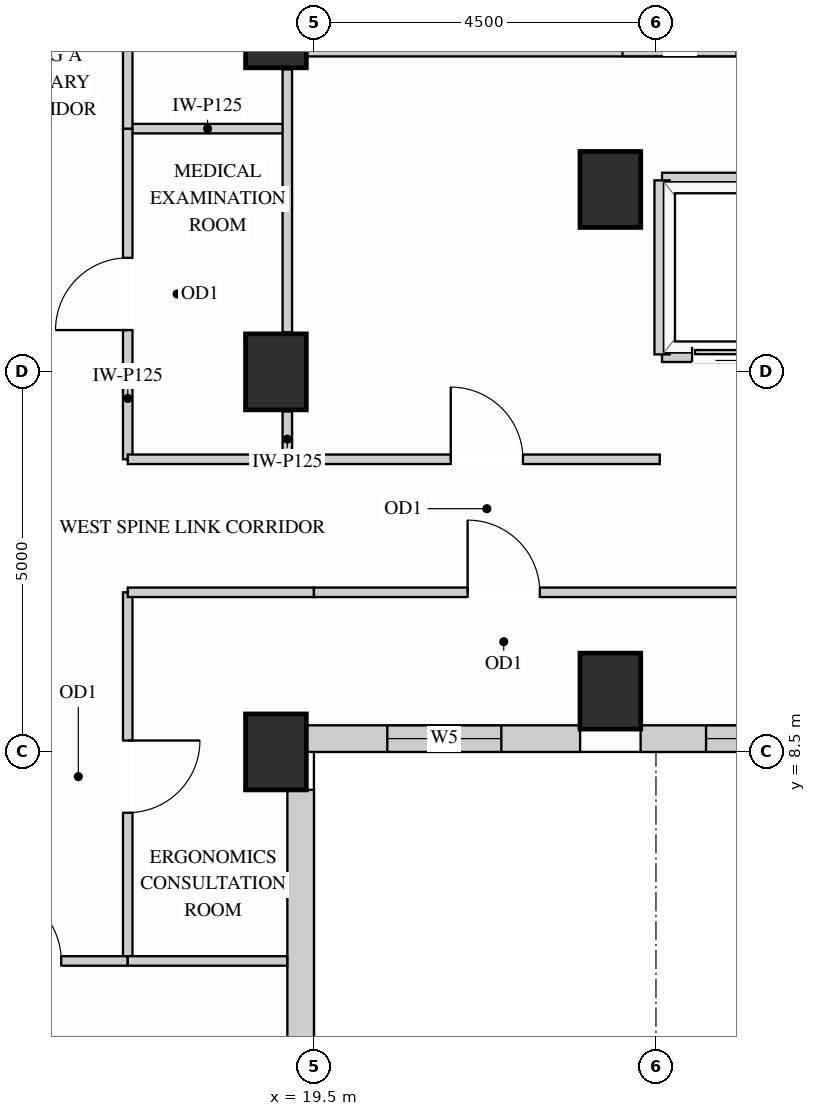
"""IFC4 building model, lengths in metres.
Left out: names, types, materials, properties, quantities, classifications, styles, units other than length and angle.
Written with IfcOpenShell. Run it as: python <this file> out.ifc"""

import sys

from ifc_helpers import new_model, si_unit, direction, frame, frame_2d, origin, origin_2d, place, context, subcontext, project, spatial, rectangle, extrude, source, transform, mapped, element, fill, save


model = new_model("IFC4")
c1 = context("Model", 3, precision=1e-05, world=origin(), true_north=direction((0.0, 1.0)))
c2 = subcontext(c1, "Body", "Model", "MODEL_VIEW")
j1 = project(units=[si_unit("LENGTHUNIT", "METRE"), si_unit("PLANEANGLEUNIT", "RADIAN")], contexts=[c1])
p1 = place(None, origin())
s1 = spatial("IfcSite", under=j1, at=p1, CompositionType="ELEMENT")
p2 = place(p1, origin())
s2 = spatial("IfcBuilding", under=s1, at=p2, CompositionType="ELEMENT")
p3 = place(p2, frame((0.0, 0.0, 182.7)))
s3 = spatial("IfcBuildingStorey", under=s2, at=p3, CompositionType="ELEMENT", Elevation=182.7)
m1 = source(origin(), c2, "Body", "SweptSolid", [
    extrude(rectangle(XDim=0.8, YDim=1.0, at=origin_2d()), origin(), (0.0, 0.0, 1.0), 3.4),
])
for number, where, z_axis, x_axis in (
    (1, (19.0, 13.5, 0.0), (0.0, 0.0, 1.0), (1.0, 0.0, 0.0)),
    (2, (19.0, 18.0, 0.0), (0.0, 0.0, 1.0), (1.0, 0.0, 0.0)),
    (3, (19.0, 8.5, 0.0), (0.0, 0.0, 1.0), (1.0, 0.0, 0.0)),
    (4, (23.4, 15.9, 0.0), (0.0, 0.0, 1.0), (1.0, 0.0, 0.0)),
    (5, (23.4, 9.3, 0.0), (0.0, 0.0, 1.0), (1.0, 0.0, 0.0)),
):
    element("IfcColumn", number, at=place(p3, frame(where, z_axis=z_axis, x_axis=x_axis)), inside=s3, PredefinedType="COLUMN", context=c2, shape_type="MappedRepresentation", body=[
        mapped(m1, transform((0.0, 0.0, 0.0), x_axis=(1.0, 0.0, 0.0), y_axis=(0.0, 1.0, 0.0), z_axis=(0.0, 0.0, 1.0))),
    ])
m2 = source(origin(), c2, "Body", "SweptSolid", [
    extrude(rectangle(XDim=4.004, YDim=0.35, at=frame_2d((2.002, 0.0))), origin(), (0.0, 0.0, 1.0), 2.612),
])
p4 = place(p3, frame((19.325, 3.998, 0.0), z_axis=(0.0, 0.0, 1.0), x_axis=(0.0, 1.0, 0.0)))
e6 = element("IfcWall", 6, at=p4, inside=s3, PredefinedType="SOLIDWALL", context=c2, shape_type="MappedRepresentation", body=[
    mapped(m2, transform((0.0, 0.0, 0.0), x_axis=(1.0, 0.0, 0.0), y_axis=(0.0, 1.0, 0.0), z_axis=(0.0, 0.0, 1.0))),
])
p5 = place(p3, frame((19.398, 8.675, 0.0), z_axis=(0.0, 0.0, 1.0), x_axis=(1.0, 0.0, 0.0)))
e7 = element("IfcWall", 7, at=p5, inside=s3, PredefinedType="SOLIDWALL", context=c2, shape_type="SweptSolid", body=[
    extrude(rectangle(XDim=3.604, YDim=0.35, at=frame_2d((1.802, 0.0))), origin(), (0.0, 0.0, 1.0), 3.385),
])
p6 = place(p5, frame((1.067, 0.0, 0.78)))
e8 = element("IfcOpeningElement", 8, at=p6, cuts=e7, PredefinedType="OPENING", context=c2, shape_type="SweptSolid", body=[
    extrude(rectangle(XDim=1.5, YDim=2.0, at=frame_2d((0.75, 1.0))), frame((0.0, 0.185, 0.0), z_axis=(0.0, -1.0, 0.0), x_axis=(1.0, 0.0, 0.0)), (0.0, 0.0, 1.0), 0.37),
])
p7 = place(p3, frame((23.798, 8.675, 0.0), z_axis=(0.0, 0.0, 1.0), x_axis=(1.0, 0.0, 0.0)))
e9 = element("IfcWall", 9, at=p7, inside=s3, PredefinedType="SOLIDWALL", context=c2, shape_type="SweptSolid", body=[
    extrude(rectangle(XDim=6.304, YDim=0.35, at=frame_2d((3.152, 0.0))), origin(), (0.0, 0.0, 1.0), 3.385),
])
p8 = place(p7, frame((0.861, 0.0, 0.78)))
e10 = element("IfcOpeningElement", 10, at=p8, cuts=e9, PredefinedType="OPENING", context=c2, shape_type="SweptSolid", body=[
    extrude(rectangle(XDim=1.5, YDim=2.0, at=frame_2d((0.75, 1.0))), frame((0.0, 0.185, 0.0), z_axis=(0.0, -1.0, 0.0), x_axis=(1.0, 0.0, 0.0)), (0.0, 0.0, 1.0), 0.37),
])
p9 = place(p7, frame((3.943, 0.0, 0.78)))
e11 = element("IfcOpeningElement", 11, at=p9, cuts=e9, PredefinedType="OPENING", context=c2, shape_type="SweptSolid", body=[
    extrude(rectangle(XDim=1.5, YDim=2.0, at=frame_2d((0.75, 1.0))), frame((0.0, 0.185, 0.0), z_axis=(0.0, -1.0, 0.0), x_axis=(1.0, 0.0, 0.0)), (0.0, 0.0, 1.0), 0.37),
])
p10 = place(p3, frame((34.502, 17.825, 0.0), z_axis=(0.0, 0.0, 1.0), x_axis=(-1.0, 0.0, 0.0)))
e12 = element("IfcWall", 12, at=p10, inside=s3, PredefinedType="SOLIDWALL", context=c2, shape_type="SweptSolid", body=[
    extrude(rectangle(XDim=15.104, YDim=0.35, at=frame_2d((7.552, 0.0))), origin(), (0.0, 0.0, 1.0), 3.385),
])
p11 = place(p10, frame((4.131, 0.0, 0.78)))
e13 = element("IfcOpeningElement", 13, at=p11, cuts=e12, PredefinedType="OPENING", context=c2, shape_type="SweptSolid", body=[
    extrude(rectangle(XDim=1.5, YDim=2.0, at=frame_2d((0.75, 1.0))), frame((0.0, 0.185, 0.0), z_axis=(0.0, -1.0, 0.0), x_axis=(1.0, 0.0, 0.0)), (0.0, 0.0, 1.0), 0.37),
])
p12 = place(p10, frame((9.442, 0.0, 0.78)))
e14 = element("IfcOpeningElement", 14, at=p12, cuts=e12, PredefinedType="OPENING", context=c2, shape_type="SweptSolid", body=[
    extrude(rectangle(XDim=1.5, YDim=2.0, at=frame_2d((0.75, 1.0))), frame((0.0, 0.185, 0.0), z_axis=(0.0, -1.0, 0.0), x_axis=(1.0, 0.0, 0.0)), (0.0, 0.0, 1.0), 0.37),
])
m3 = source(origin(), c2, "Body", "SweptSolid", [
    extrude(rectangle(XDim=2.1, YDim=0.125, at=frame_2d((1.05, 0.0))), origin(), (0.0, 0.0, 1.0), 2.916),
])
p13 = place(p3, frame((17.05, 16.7, 0.0), z_axis=(0.0, 0.0, 1.0), x_axis=(1.0, 0.0, 0.0)))
e15 = element("IfcWall", 15, at=p13, inside=s3, PredefinedType="PARTITIONING", context=c2, shape_type="MappedRepresentation", body=[
    mapped(m3, transform((0.0, 0.0, 0.0), x_axis=(1.0, 0.0, 0.0), y_axis=(0.0, 1.0, 0.0), z_axis=(0.0, 0.0, 1.0))),
])
m4 = source(origin(), c2, "Body", "SweptSolid", [
    extrude(rectangle(XDim=0.63, YDim=0.125, at=frame_2d((0.315, 0.0))), origin(), (0.0, 0.0, 1.0), 2.773),
])
p14 = place(p3, frame((19.15, 12.35, 0.0), z_axis=(0.0, 0.0, 1.0), x_axis=(0.0, 1.0, 0.0)))
e16 = element("IfcWall", 16, at=p14, inside=s3, PredefinedType="PARTITIONING", context=c2, shape_type="MappedRepresentation", body=[
    mapped(m4, transform((0.0, 0.0, 0.0), x_axis=(1.0, 0.0, 0.0), y_axis=(0.0, 1.0, 0.0), z_axis=(0.0, 0.0, 1.0))),
])
m5 = source(origin(), c2, "Body", "SweptSolid", [
    extrude(rectangle(XDim=3.46, YDim=0.125, at=frame_2d((1.73, 0.0))), origin(), (0.0, 0.0, 1.0), 2.773),
])
p15 = place(p3, frame((19.15, 14.02, 0.0), z_axis=(0.0, 0.0, 1.0), x_axis=(0.0, 1.0, 0.0)))
e17 = element("IfcWall", 17, at=p15, inside=s3, PredefinedType="PARTITIONING", context=c2, shape_type="MappedRepresentation", body=[
    mapped(m5, transform((0.0, 0.0, 0.0), x_axis=(1.0, 0.0, 0.0), y_axis=(0.0, 1.0, 0.0), z_axis=(0.0, 0.0, 1.0))),
])
p16 = place(p3, frame((17.05, 12.35, 0.0), z_axis=(0.0, 0.0, 1.0), x_axis=(0.0, 1.0, 0.0)))
e18 = element("IfcWall", 18, at=p16, inside=s3, PredefinedType="PARTITIONING", context=c2, shape_type="SweptSolid", body=[
    extrude(rectangle(XDim=4.35, YDim=0.125, at=frame_2d((2.175, 0.0))), origin(), (0.0, 0.0, 1.0), 3.385),
])
p17 = place(p16, frame((1.7, 0.0, 0.0)))
e19 = element("IfcOpeningElement", 19, at=p17, cuts=e18, PredefinedType="OPENING", context=c2, shape_type="SweptSolid", body=[
    extrude(rectangle(XDim=0.95, YDim=2.15, at=frame_2d((0.475, 1.075))), frame((0.0, 0.073, 0.0), z_axis=(0.0, -1.0, 0.0), x_axis=(1.0, 0.0, 0.0)), (0.0, 0.0, 1.0), 0.145),
])
p18 = place(p3, frame((17.05, 16.7, 0.0), z_axis=(0.0, 0.0, 1.0), x_axis=(0.0, 1.0, 0.0)))
e20 = element("IfcWall", 20, at=p18, inside=s3, PredefinedType="PARTITIONING", context=c2, shape_type="SweptSolid", body=[
    extrude(rectangle(XDim=6.65, YDim=0.125, at=frame_2d((3.325, 0.0))), origin(), (0.0, 0.0, 1.0), 3.385),
])
p19 = place(p18, frame((2.85, 0.0, 0.0)))
e21 = element("IfcOpeningElement", 21, at=p19, cuts=e20, PredefinedType="OPENING", context=c2, shape_type="SweptSolid", body=[
    extrude(rectangle(XDim=0.95, YDim=2.15, at=frame_2d((0.475, 1.075))), frame((0.0, 0.073, 0.0), z_axis=(0.0, -1.0, 0.0), x_axis=(1.0, 0.0, 0.0)), (0.0, 0.0, 1.0), 0.145),
])
p20 = place(p3, frame((17.05, 5.75, 0.0), z_axis=(0.0, 0.0, 1.0), x_axis=(0.0, 1.0, 0.0)))
e22 = element("IfcWall", 22, at=p20, inside=s3, PredefinedType="PARTITIONING", context=c2, shape_type="SweptSolid", body=[
    extrude(rectangle(XDim=4.85, YDim=0.125, at=frame_2d((2.425, 0.0))), origin(), (0.0, 0.0, 1.0), 3.385),
])
p21 = place(p20, frame((1.95, 0.0, 0.0)))
e23 = element("IfcOpeningElement", 23, at=p21, cuts=e22, PredefinedType="OPENING", context=c2, shape_type="SweptSolid", body=[
    extrude(rectangle(XDim=0.95, YDim=2.15, at=frame_2d((0.475, 1.075))), frame((0.0, 0.073, 0.0), z_axis=(0.0, -1.0, 0.0), x_axis=(1.0, 0.0, 0.0)), (0.0, 0.0, 1.0), 0.145),
])
m6 = source(origin(), c2, "Body", "SweptSolid", [
    extrude(rectangle(XDim=2.45, YDim=0.125, at=frame_2d((1.225, 0.0))), origin(), (0.0, 0.0, 1.0), 3.385),
])
p22 = place(p3, frame((17.05, 12.35, 0.0), z_axis=(0.0, 0.0, 1.0), x_axis=(1.0, 0.0, 0.0)))
e24 = element("IfcWall", 24, at=p22, inside=s3, PredefinedType="PARTITIONING", context=c2, shape_type="MappedRepresentation", body=[
    mapped(m6, transform((0.0, 0.0, 0.0), x_axis=(1.0, 0.0, 0.0), y_axis=(0.0, 1.0, 0.0), z_axis=(0.0, 0.0, 1.0))),
])
p23 = place(p3, frame((19.5, 12.35, 0.0), z_axis=(0.0, 0.0, 1.0), x_axis=(1.0, 0.0, 0.0)))
e25 = element("IfcWall", 25, at=p23, inside=s3, PredefinedType="PARTITIONING", context=c2, shape_type="SweptSolid", body=[
    extrude(rectangle(XDim=4.55, YDim=0.125, at=frame_2d((2.275, 0.0))), origin(), (0.0, 0.0, 1.0), 3.385),
])
p24 = place(p23, frame((1.8, 0.0, 0.0)))
e26 = element("IfcOpeningElement", 26, at=p24, cuts=e25, PredefinedType="OPENING", context=c2, shape_type="SweptSolid", body=[
    extrude(rectangle(XDim=0.95, YDim=2.15, at=frame_2d((0.475, 1.075))), frame((0.0, 0.073, 0.0), z_axis=(0.0, -1.0, 0.0), x_axis=(1.0, 0.0, 0.0)), (0.0, 0.0, 1.0), 0.145),
])
p25 = place(p3, frame((17.05, 10.6, 0.0), z_axis=(0.0, 0.0, 1.0), x_axis=(1.0, 0.0, 0.0)))
e27 = element("IfcWall", 27, at=p25, inside=s3, PredefinedType="PARTITIONING", context=c2, shape_type="MappedRepresentation", body=[
    mapped(m6, transform((0.0, 0.0, 0.0), x_axis=(1.0, 0.0, 0.0), y_axis=(0.0, 1.0, 0.0), z_axis=(0.0, 0.0, 1.0))),
])
p26 = place(p3, frame((19.5, 10.6, 0.0), z_axis=(0.0, 0.0, 1.0), x_axis=(1.0, 0.0, 0.0)))
e28 = element("IfcWall", 28, at=p26, inside=s3, PredefinedType="PARTITIONING", context=c2, shape_type="SweptSolid", body=[
    extrude(rectangle(XDim=7.45, YDim=0.125, at=frame_2d((3.725, 0.0))), origin(), (0.0, 0.0, 1.0), 3.385),
])
p27 = place(p26, frame((2.022, 0.0, 0.0)))
e29 = element("IfcOpeningElement", 29, at=p27, cuts=e28, PredefinedType="OPENING", context=c2, shape_type="SweptSolid", body=[
    extrude(rectangle(XDim=0.95, YDim=2.15, at=frame_2d((0.475, 1.075))), frame((0.0, 0.073, 0.0), z_axis=(0.0, -1.0, 0.0), x_axis=(1.0, 0.0, 0.0)), (0.0, 0.0, 1.0), 0.145),
])
p28 = place(p3, frame((14.35, 5.75, 0.0), z_axis=(0.0, 0.0, 1.0), x_axis=(1.0, 0.0, 0.0)))
e30 = element("IfcWall", 30, at=p28, inside=s3, PredefinedType="PARTITIONING", context=c2, shape_type="SweptSolid", body=[
    extrude(rectangle(XDim=2.7, YDim=0.125, at=frame_2d((1.35, 0.0))), origin(), (0.0, 0.0, 1.0), 3.385),
])
p29 = place(p28, frame((0.875, 0.0, 0.0)))
e31 = element("IfcOpeningElement", 31, at=p29, cuts=e30, PredefinedType="OPENING", context=c2, shape_type="SweptSolid", body=[
    extrude(rectangle(XDim=0.95, YDim=2.15, at=frame_2d((0.475, 1.075))), frame((0.0, 0.073, 0.0), z_axis=(0.0, -1.0, 0.0), x_axis=(1.0, 0.0, 0.0)), (0.0, 0.0, 1.0), 0.145),
])
m7 = source(origin(), c2, "Body", "SweptSolid", [
    extrude(rectangle(XDim=2.098, YDim=0.125, at=frame_2d((1.049, 0.0))), origin(), (0.0, 0.0, 1.0), 3.385),
])
p30 = place(p3, frame((17.05, 5.75, 0.0), z_axis=(0.0, 0.0, 1.0), x_axis=(1.0, 0.0, 0.0)))
e32 = element("IfcWall", 32, at=p30, inside=s3, PredefinedType="PARTITIONING", context=c2, shape_type="MappedRepresentation", body=[
    mapped(m7, transform((0.0, 0.0, 0.0), x_axis=(1.0, 0.0, 0.0), y_axis=(0.0, 1.0, 0.0), z_axis=(0.0, 0.0, 1.0))),
])
m8 = source(origin(), c2, "Body", "SweptSolid", [
    extrude(rectangle(XDim=1.89, YDim=0.2, at=frame_2d((0.945, 0.0))), origin(), (0.0, 0.0, 1.0), 2.773),
])
p31 = place(p3, frame((24.08, 16.02, 0.0), z_axis=(0.0, 0.0, 1.0), x_axis=(1.0, 0.0, 0.0)))
e33 = element("IfcWall", 33, at=p31, inside=s3, PredefinedType="PARTITIONING", context=c2, shape_type="MappedRepresentation", body=[
    mapped(m8, transform((0.0, 0.0, 0.0), x_axis=(1.0, 0.0, 0.0), y_axis=(0.0, 1.0, 0.0), z_axis=(0.0, 0.0, 1.0))),
])
p32 = place(p3, frame((24.08, 13.73, 0.0), z_axis=(0.0, 0.0, 1.0), x_axis=(1.0, 0.0, 0.0)))
e34 = element("IfcWall", 34, at=p32, inside=s3, PredefinedType="PARTITIONING", context=c2, shape_type="SweptSolid", body=[
    extrude(rectangle(XDim=1.89, YDim=0.2, at=frame_2d((0.945, 0.0))), origin(), (0.0, 0.0, 1.0), 2.466),
])
p33 = place(p32, frame((0.395, 0.0, 0.0)))
e35 = element("IfcOpeningElement", 35, at=p33, cuts=e34, PredefinedType="OPENING", context=c2, shape_type="SweptSolid", body=[
    extrude(rectangle(XDim=1.1, YDim=2.2, at=frame_2d((0.55, 1.1))), frame((0.0, 0.11, 0.0), z_axis=(0.0, -1.0, 0.0), x_axis=(1.0, 0.0, 0.0)), (0.0, 0.0, 1.0), 0.22),
])
m9 = source(origin(), c2, "Body", "SweptSolid", [
    extrude(rectangle(XDim=2.29, YDim=0.2, at=frame_2d((1.145, 0.0))), origin(), (0.0, 0.0, 1.0), 3.385),
])
p34 = place(p3, frame((24.08, 13.73, 0.0), z_axis=(0.0, 0.0, 1.0), x_axis=(0.0, 1.0, 0.0)))
e36 = element("IfcWall", 36, at=p34, inside=s3, PredefinedType="PARTITIONING", context=c2, shape_type="MappedRepresentation", body=[
    mapped(m9, transform((0.0, 0.0, 0.0), x_axis=(1.0, 0.0, 0.0), y_axis=(0.0, 1.0, 0.0), z_axis=(0.0, 0.0, 1.0))),
])
m10 = source(origin(), c2, "Body", "SweptSolid", [
    extrude(rectangle(XDim=1.1, YDim=2.2, at=frame_2d((0.55, 1.1))), frame((0.0, 0.025, 0.0), z_axis=(0.0, -1.0, 0.0), x_axis=(1.0, 0.0, 0.0)), (0.0, 0.0, 1.0), 0.05),
])
p35 = place(p33, origin())
e37 = element("IfcDoor", 37, at=p35, inside=s3, OperationType="SLIDING_TO_LEFT", PredefinedType="DOOR", context=c2, shape_type="MappedRepresentation", body=[
    mapped(m10, transform((0.0, 0.0, 0.0), x_axis=(1.0, 0.0, 0.0), y_axis=(0.0, 1.0, 0.0), z_axis=(0.0, 0.0, 1.0))),
])
fill(e35, e37)
m11 = source(origin(), c2, "Body", "SweptSolid", [
    extrude(rectangle(XDim=0.95, YDim=2.15, at=frame_2d((0.475, 1.075))), frame((0.0, 0.025, 0.0), z_axis=(0.0, -1.0, 0.0), x_axis=(1.0, 0.0, 0.0)), (0.0, 0.0, 1.0), 0.05),
])
p36 = place(p21, origin())
e38 = element("IfcDoor", 38, at=p36, inside=s3, OperationType="SINGLE_SWING_RIGHT", PredefinedType="DOOR", context=c2, shape_type="MappedRepresentation", body=[
    mapped(m11, transform((0.0, 0.0, 0.0), x_axis=(1.0, 0.0, 0.0), y_axis=(0.0, 1.0, 0.0), z_axis=(0.0, 0.0, 1.0))),
])
fill(e23, e38)
p37 = place(p17, origin())
e39 = element("IfcDoor", 39, at=p37, inside=s3, OperationType="SINGLE_SWING_LEFT", PredefinedType="DOOR", context=c2, shape_type="MappedRepresentation", body=[
    mapped(m11, transform((0.0, 0.0, 0.0), x_axis=(1.0, 0.0, 0.0), y_axis=(0.0, 1.0, 0.0), z_axis=(0.0, 0.0, 1.0))),
])
fill(e19, e39)
p38 = place(p29, origin())
e40 = element("IfcDoor", 40, at=p38, inside=s3, OperationType="SINGLE_SWING_LEFT", PredefinedType="DOOR", context=c2, shape_type="MappedRepresentation", body=[
    mapped(m11, transform((0.0, 0.0, 0.0), x_axis=(1.0, 0.0, 0.0), y_axis=(0.0, 1.0, 0.0), z_axis=(0.0, 0.0, 1.0))),
])
fill(e31, e40)
p39 = place(p24, origin())
e41 = element("IfcDoor", 41, at=p39, inside=s3, OperationType="SINGLE_SWING_LEFT", PredefinedType="DOOR", context=c2, shape_type="MappedRepresentation", body=[
    mapped(m11, transform((0.0, 0.0, 0.0), x_axis=(1.0, 0.0, 0.0), y_axis=(0.0, 1.0, 0.0), z_axis=(0.0, 0.0, 1.0))),
])
fill(e26, e41)
p40 = place(p27, origin())
e42 = element("IfcDoor", 42, at=p40, inside=s3, OperationType="SINGLE_SWING_LEFT", PredefinedType="DOOR", context=c2, shape_type="MappedRepresentation", body=[
    mapped(m11, transform((0.0, 0.0, 0.0), x_axis=(1.0, 0.0, 0.0), y_axis=(0.0, 1.0, 0.0), z_axis=(0.0, 0.0, 1.0))),
])
fill(e29, e42)
m12 = source(origin(), c2, "Body", "SweptSolid", [
    extrude(rectangle(XDim=1.5, YDim=2.0, at=frame_2d((0.75, 1.0))), frame((0.0, 0.03, 0.0), z_axis=(0.0, -1.0, 0.0), x_axis=(1.0, 0.0, 0.0)), (0.0, 0.0, 1.0), 0.06),
])
p41 = place(p6, origin())
e43 = element("IfcWindow", 43, at=p41, inside=s3, PartitioningType="SINGLE_PANEL", PredefinedType="WINDOW", context=c2, shape_type="MappedRepresentation", body=[
    mapped(m12, transform((0.0, 0.0, 0.0), x_axis=(1.0, 0.0, 0.0), y_axis=(0.0, 1.0, 0.0), z_axis=(0.0, 0.0, 1.0))),
])
fill(e8, e43)
p42 = place(p8, origin())
e44 = element("IfcWindow", 44, at=p42, inside=s3, PartitioningType="SINGLE_PANEL", PredefinedType="WINDOW", context=c2, shape_type="MappedRepresentation", body=[
    mapped(m12, transform((0.0, 0.0, 0.0), x_axis=(1.0, 0.0, 0.0), y_axis=(0.0, 1.0, 0.0), z_axis=(0.0, 0.0, 1.0))),
])
fill(e10, e44)
save(model, sys.argv[1])
